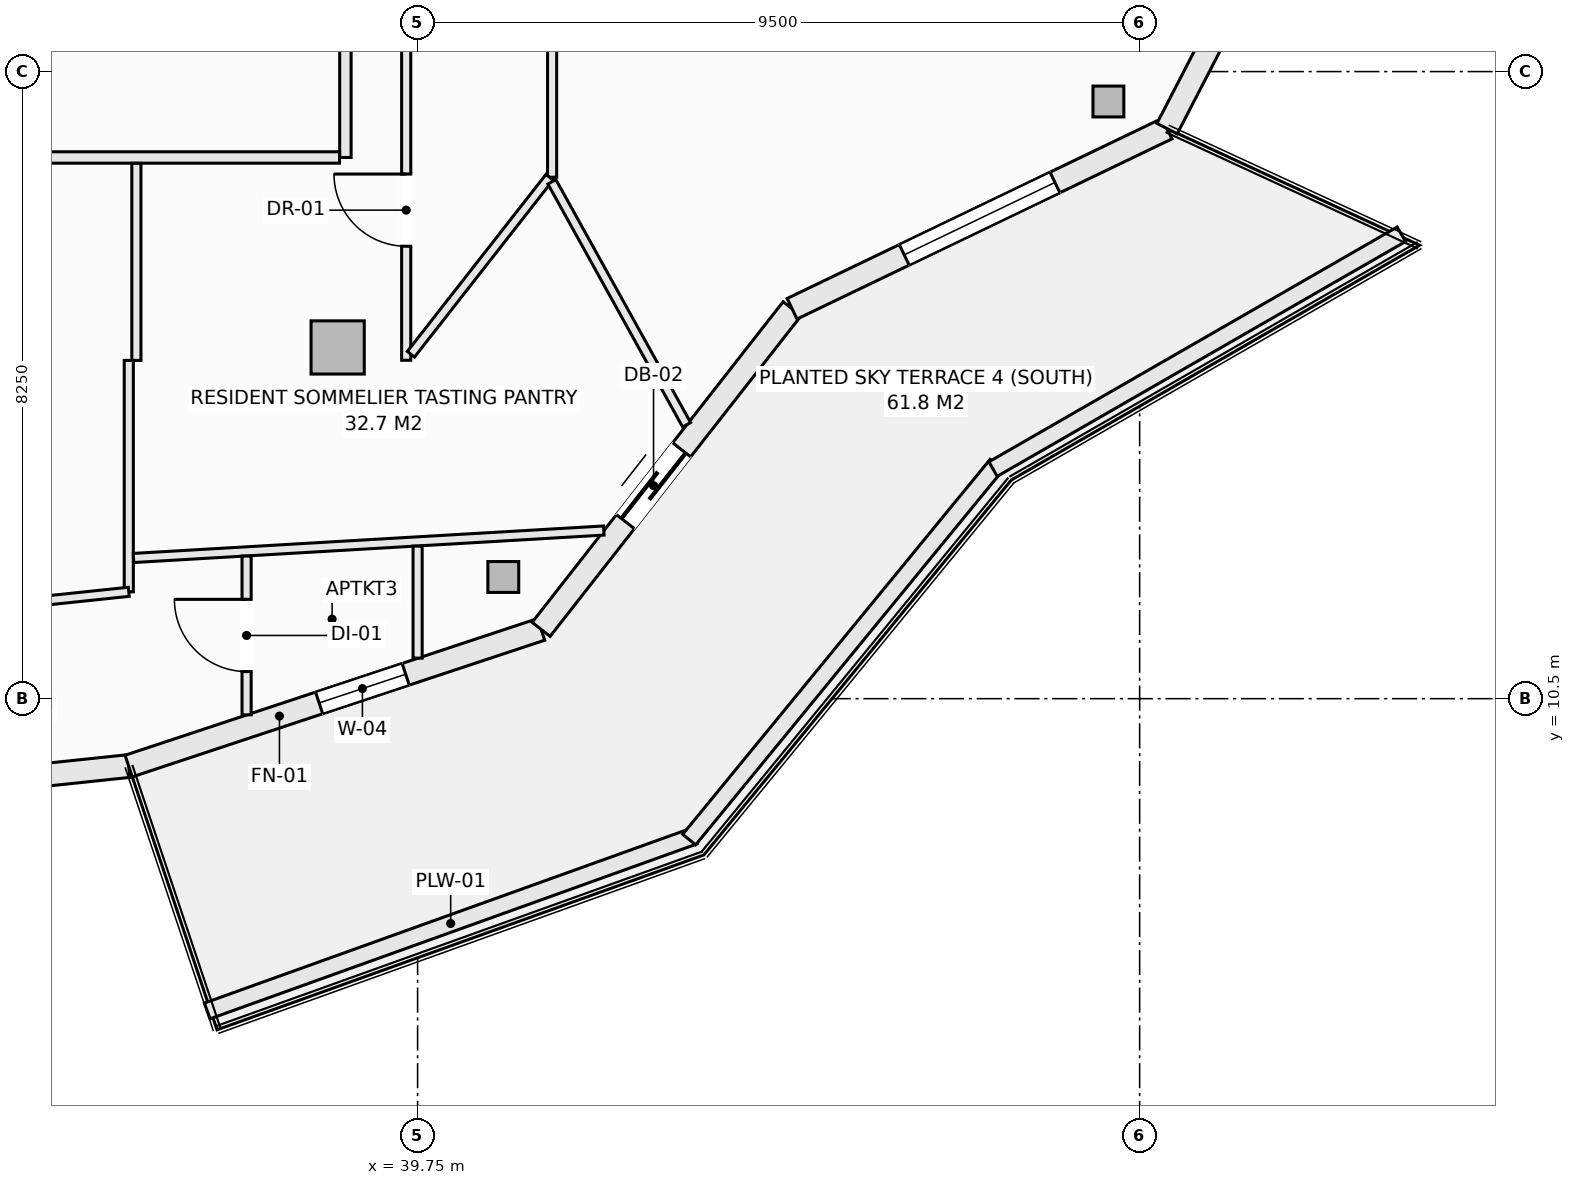
"""IFC4 building model, lengths in metres.
Left out: names, types, materials, properties, quantities, classifications, styles, units other than length and angle.
Written with IfcOpenShell. Run it as: python <this file> out.ifc"""

import sys

from ifc_helpers import new_model, si_unit, direction, frame, frame_2d, origin, origin_2d, place, context, subcontext, project, spatial, rectangle, hollow_rectangle, extrude, element, fill, save


model = new_model("IFC4")
c1 = context("Model", 3, precision=1e-05, world=origin(), true_north=direction((0.0, 1.0)))
c2 = subcontext(c1, "Body", "Model", "MODEL_VIEW")
j1 = project(units=[si_unit("LENGTHUNIT", "METRE"), si_unit("PLANEANGLEUNIT", "RADIAN")], contexts=[c1])
p1 = place(None, origin())
s1 = spatial("IfcSite", under=j1, at=p1, CompositionType="ELEMENT")
p2 = place(p1, origin())
s2 = spatial("IfcBuilding", under=s1, at=p2, CompositionType="ELEMENT")
p3 = place(p2, frame((0.0, 0.0, 242.6)))
s3 = spatial("IfcBuildingStorey", under=s2, at=p3, CompositionType="ELEMENT", Elevation=242.6)
for number, where, z_axis, x_axis in (
    (1, (40.878, 12.101, -0.27), (0.0, 0.0, 1.0), (1.0, 0.0, 0.0)),
    (2, (48.839, 18.356, -0.27), (0.0, 0.0, 1.0), (1.0, 0.0, 0.0)),
):
    element("IfcColumn", number, at=place(p3, frame(where, z_axis=z_axis, x_axis=x_axis)), inside=s3, PredefinedType="COLUMN", context=c2, shape_type="SweptSolid", body=[
        extrude(hollow_rectangle(XDim=0.406, YDim=0.406, WallThickness=0.016, at=origin_2d()), origin(), (0.0, 0.0, 1.0), 3.3),
    ])
p4 = place(p3, frame((38.698, 15.121, -0.27), z_axis=(0.0, 0.0, 1.0), x_axis=(1.0, 0.0, 0.0)))
e3 = element("IfcColumn", 3, at=p4, inside=s3, PredefinedType="COLUMN", context=c2, shape_type="SweptSolid", body=[
    extrude(rectangle(XDim=0.7, YDim=0.7, at=origin_2d()), origin(), (0.0, 0.0, 1.0), 3.3),
])
p5 = place(p3, frame((30.125, 9.0, 0.0), z_axis=(0.0, 0.0, 1.0), x_axis=(0.994500425783, 0.10473253132, 0.0)))
e4 = element("IfcWall", 4, at=p5, inside=s3, PredefinedType="SOLIDWALL", context=c2, shape_type="SweptSolid", body=[
    extrude(rectangle(XDim=5.856, YDim=0.3, at=frame_2d((2.928, 0.0))), origin(), (0.0, 0.0, 1.0), 2.605),
])
p6 = place(p5, frame((1.828, 0.0, 0.72)))
e5 = element("IfcOpeningElement", 5, at=p6, cuts=e4, PredefinedType="OPENING", context=c2, shape_type="SweptSolid", body=[
    extrude(rectangle(XDim=2.2, YDim=1.65, at=frame_2d((1.1, 0.825))), frame((0.0, 0.16, 0.0), z_axis=(0.0, -1.0, 0.0), x_axis=(1.0, 0.0, 0.0)), (0.0, 0.0, 1.0), 0.32),
])
p7 = place(p3, frame((35.948, 9.613, 0.0), z_axis=(0.0, 0.0, 1.0), x_axis=(0.949232769585, 0.314574552605, 0.0)))
e6 = element("IfcWall", 6, at=p7, inside=s3, PredefinedType="SOLIDWALL", context=c2, shape_type="SweptSolid", body=[
    extrude(rectangle(XDim=5.717, YDim=0.3, at=frame_2d((2.858, 0.0))), origin(), (0.0, 0.0, 1.0), 2.605),
])
p8 = place(p7, frame((2.64, 0.0, 0.72)))
e7 = element("IfcOpeningElement", 7, at=p8, cuts=e6, PredefinedType="OPENING", context=c2, shape_type="SweptSolid", body=[
    extrude(rectangle(XDim=1.2, YDim=1.65, at=frame_2d((0.6, 0.825))), frame((0.0, 0.16, 0.0), z_axis=(0.0, -1.0, 0.0), x_axis=(1.0, 0.0, 0.0)), (0.0, 0.0, 1.0), 0.32),
])
p9 = place(p3, frame((41.375, 11.412, 0.0), z_axis=(0.0, 0.0, 1.0), x_axis=(0.61644588519, 0.787397276241, 0.0)))
e8 = element("IfcWall", 8, at=p9, inside=s3, PredefinedType="SOLIDWALL", context=c2, shape_type="SweptSolid", body=[
    extrude(rectangle(XDim=5.357, YDim=0.3, at=frame_2d((2.678, 0.0))), origin(), (0.0, 0.0, 1.0), 2.605),
])
p10 = place(p9, frame((1.8, 0.0, 0.0)))
e9 = element("IfcOpeningElement", 9, at=p10, cuts=e8, PredefinedType="OPENING", context=c2, shape_type="SweptSolid", body=[
    extrude(rectangle(XDim=1.2, YDim=2.2, at=frame_2d((0.6, 1.1))), frame((0.0, 0.16, 0.0), z_axis=(0.0, -1.0, 0.0), x_axis=(1.0, 0.0, 0.0)), (0.0, 0.0, 1.0), 0.32),
])
p11 = place(p3, frame((44.677, 15.63, 0.0), z_axis=(0.0, 0.0, 1.0), x_axis=(0.901355238351, 0.433080517106, 0.0)))
e10 = element("IfcWall", 10, at=p11, inside=s3, PredefinedType="SOLIDWALL", context=c2, shape_type="SweptSolid", body=[
    extrude(rectangle(XDim=5.473, YDim=0.3, at=frame_2d((2.737, 0.0))), origin(), (0.0, 0.0, 1.0), 2.605),
])
p12 = place(p11, frame((1.637, 0.0, 0.72)))
e11 = element("IfcOpeningElement", 11, at=p12, cuts=e10, PredefinedType="OPENING", context=c2, shape_type="SweptSolid", body=[
    extrude(rectangle(XDim=2.2, YDim=1.65, at=frame_2d((1.1, 0.825))), frame((0.0, 0.16, 0.0), z_axis=(0.0, -1.0, 0.0), x_axis=(1.0, 0.0, 0.0)), (0.0, 0.0, 1.0), 0.32),
])
p13 = place(p3, frame((49.611, 18.0, 0.0), z_axis=(0.0, 0.0, 1.0), x_axis=(0.459793771602, 0.888025724625, 0.0)))
e12 = element("IfcWall", 12, at=p13, inside=s3, PredefinedType="SOLIDWALL", context=c2, shape_type="SweptSolid", body=[
    extrude(rectangle(XDim=4.889, YDim=0.3, at=frame_2d((2.444, 0.0))), origin(), (0.0, 0.0, 1.0), 2.605),
])
p14 = place(p13, frame((1.344, 0.0, 0.72)))
e13 = element("IfcOpeningElement", 13, at=p14, cuts=e12, PredefinedType="OPENING", context=c2, shape_type="SweptSolid", body=[
    extrude(rectangle(XDim=2.2, YDim=1.65, at=frame_2d((1.1, 0.825))), frame((0.0, 0.16, 0.0), z_axis=(0.0, -1.0, 0.0), x_axis=(1.0, 0.0, 0.0)), (0.0, 0.0, 1.0), 0.32),
])
p15 = place(p3, frame((36.982, 6.392, 0.0), z_axis=(0.0, 0.0, 1.0), x_axis=(0.941139090914, 0.338019543152, 0.0)))
e14 = element("IfcWall", 14, at=p15, inside=s3, PredefinedType="PARAPET", context=c2, shape_type="SweptSolid", body=[
    extrude(rectangle(XDim=6.807, YDim=0.22, at=frame_2d((3.403, 0.0))), origin(), (0.0, 0.0, 1.0), 0.52),
])
p16 = place(p3, frame((43.323, 8.646, 0.0), z_axis=(0.0, 0.0, 1.0), x_axis=(0.63407318032, 0.77327304492, 0.0)))
e15 = element("IfcWall", 15, at=p16, inside=s3, PredefinedType="PARAPET", context=c2, shape_type="SweptSolid", body=[
    extrude(rectangle(XDim=6.379, YDim=0.22, at=frame_2d((3.189, 0.0))), origin(), (0.0, 0.0, 1.0), 0.52),
])
p17 = place(p3, frame((47.321, 13.521, 0.0), z_axis=(0.0, 0.0, 1.0), x_axis=(0.866901621005, 0.49847926687, 0.0)))
e16 = element("IfcWall", 16, at=p17, inside=s3, PredefinedType="PARAPET", context=c2, shape_type="SweptSolid", body=[
    extrude(rectangle(XDim=6.197, YDim=0.22, at=frame_2d((3.098, 0.0))), origin(), (0.0, 0.0, 1.0), 0.52),
])
p18 = place(p3, frame((38.8, 17.62, 0.0), z_axis=(0.0, 0.0, 1.0), x_axis=(0.0, 1.0, 0.0)))
e17 = element("IfcWall", 17, at=p18, inside=s3, PredefinedType="PARTITIONING", context=c2, shape_type="SweptSolid", body=[
    extrude(rectangle(XDim=2.18, YDim=0.15, at=frame_2d((1.09, 0.0))), origin(), (0.0, 0.0, 1.0), 3.03),
])
p19 = place(p3, frame((30.077, 17.62, 0.0), z_axis=(0.0, 0.0, 1.0), x_axis=(1.0, 0.0, 0.0)))
e18 = element("IfcWall", 18, at=p19, inside=s3, PredefinedType="PARTITIONING", context=c2, shape_type="SweptSolid", body=[
    extrude(rectangle(XDim=8.646, YDim=0.15, at=frame_2d((4.323, 0.0))), origin(), (0.0, 0.0, 1.0), 3.03),
])
p20 = place(p19, frame((2.717, 0.0, 0.0)))
e19 = element("IfcOpeningElement", 19, at=p20, cuts=e18, PredefinedType="OPENING", context=c2, shape_type="SweptSolid", body=[
    extrude(rectangle(XDim=0.95, YDim=2.1, at=frame_2d((0.475, 1.05))), frame((0.0, 0.085, 0.0), z_axis=(0.0, -1.0, 0.0), x_axis=(1.0, 0.0, 0.0)), (0.0, 0.0, 1.0), 0.17),
])
p21 = place(p3, frame((39.6, 14.952, 0.0), z_axis=(0.0, 0.0, 1.0), x_axis=(0.0, 1.0, 0.0)))
e20 = element("IfcWall", 20, at=p21, inside=s3, PredefinedType="PARTITIONING", context=c2, shape_type="SweptSolid", body=[
    extrude(rectangle(XDim=8.068, YDim=0.12, at=frame_2d((4.034, 0.0))), origin(), (0.0, 0.0, 1.0), 2.478),
])
p22 = place(p21, frame((1.5, 0.0, 0.0)))
e21 = element("IfcOpeningElement", 21, at=p22, cuts=e20, PredefinedType="OPENING", context=c2, shape_type="SweptSolid", body=[
    extrude(rectangle(XDim=0.95, YDim=2.1, at=frame_2d((0.475, 1.05))), frame((0.0, 0.07, 0.0), z_axis=(0.0, -1.0, 0.0), x_axis=(1.0, 0.0, 0.0)), (0.0, 0.0, 1.0), 0.14),
])
p23 = place(p3, frame((41.52, 17.36, 0.0), z_axis=(0.0, 0.0, 1.0), x_axis=(0.0, 1.0, 0.0)))
e22 = element("IfcWall", 22, at=p23, inside=s3, PredefinedType="PARTITIONING", context=c2, shape_type="SweptSolid", body=[
    extrude(rectangle(XDim=3.447, YDim=0.12, at=frame_2d((1.723, 0.0))), origin(), (0.0, 0.0, 1.0), 3.03),
])
p24 = place(p3, frame((39.662, 15.031, 0.0), z_axis=(0.0, 0.0, 1.0), x_axis=(0.616497420092, 0.787356927334, 0.0)))
e23 = element("IfcWall", 23, at=p24, inside=s3, PredefinedType="PARTITIONING", context=c2, shape_type="SweptSolid", body=[
    extrude(rectangle(XDim=2.958, YDim=0.12, at=frame_2d((1.479, 0.0))), origin(), (0.0, 0.0, 1.0), 3.03),
])
p25 = place(p3, frame((36.05, 14.95, 0.0), z_axis=(0.0, 0.0, 1.0), x_axis=(0.0, 1.0, 0.0)))
e24 = element("IfcWall", 24, at=p25, inside=s3, PredefinedType="PARTITIONING", context=c2, shape_type="SweptSolid", body=[
    extrude(rectangle(XDim=2.593, YDim=0.12, at=frame_2d((1.296, 0.0))), origin(), (0.0, 0.0, 1.0), 3.03),
])
p26 = place(p3, frame((35.95, 11.906, 0.0), z_axis=(0.0, 0.0, 1.0), x_axis=(0.0, 1.0, 0.0)))
e25 = element("IfcWall", 25, at=p26, inside=s3, PredefinedType="PARTITIONING", context=c2, shape_type="SweptSolid", body=[
    extrude(rectangle(XDim=3.044, YDim=0.12, at=frame_2d((1.522, 0.0))), origin(), (0.0, 0.0, 1.0), 3.03),
])
p27 = place(p3, frame((34.468, 11.75, 0.0), z_axis=(0.0, 0.0, 1.0), x_axis=(0.994504555135, 0.104693313135, 0.0)))
e26 = element("IfcWall", 26, at=p27, inside=s3, PredefinedType="PARTITIONING", context=c2, shape_type="SweptSolid", body=[
    extrude(rectangle(XDim=1.49, YDim=0.12, at=frame_2d((0.745, 0.0))), origin(), (0.0, 0.0, 1.0), 3.03),
])
p28 = place(p3, frame((36.012, 12.351, 0.0), z_axis=(0.0, 0.0, 1.0), x_axis=(0.998301967663, 0.058251020246, 0.0)))
e27 = element("IfcWall", 27, at=p28, inside=s3, PredefinedType="PARTITIONING", context=c2, shape_type="SweptSolid", body=[
    extrude(rectangle(XDim=6.199, YDim=0.12, at=frame_2d((3.099, 0.0))), origin(), (0.0, 0.0, 1.0), 2.605),
])
p29 = place(p3, frame((37.5, 10.288, 0.0), z_axis=(0.0, 0.0, 1.0), x_axis=(0.0, 1.0, 0.0)))
e28 = element("IfcWall", 28, at=p29, inside=s3, PredefinedType="PARTITIONING", context=c2, shape_type="SweptSolid", body=[
    extrude(rectangle(XDim=2.088, YDim=0.12, at=frame_2d((1.044, 0.0))), origin(), (0.0, 0.0, 1.0), 3.03),
])
p30 = place(p29, frame((0.569, 0.0, 0.0)))
e29 = element("IfcOpeningElement", 29, at=p30, cuts=e28, PredefinedType="OPENING", context=c2, shape_type="SweptSolid", body=[
    extrude(rectangle(XDim=0.95, YDim=2.1, at=frame_2d((0.475, 1.05))), frame((0.0, 0.07, 0.0), z_axis=(0.0, -1.0, 0.0), x_axis=(1.0, 0.0, 0.0)), (0.0, 0.0, 1.0), 0.14),
])
p31 = place(p3, frame((39.75, 11.033, 0.0), z_axis=(0.0, 0.0, 1.0), x_axis=(0.0, 1.0, 0.0)))
e30 = element("IfcWall", 30, at=p31, inside=s3, PredefinedType="PARTITIONING", context=c2, shape_type="SweptSolid", body=[
    extrude(rectangle(XDim=1.474, YDim=0.12, at=frame_2d((0.737, 0.0))), origin(), (0.0, 0.0, 1.0), 3.03),
])
p32 = place(p3, frame((41.517, 17.3, 0.0), z_axis=(0.0, 0.0, 1.0), x_axis=(0.484911097078, -0.874563449917, 0.0)))
e31 = element("IfcWall", 31, at=p32, inside=s3, PredefinedType="PARTITIONING", context=c2, shape_type="SweptSolid", body=[
    extrude(rectangle(XDim=3.655, YDim=0.12, at=frame_2d((1.827, 0.0))), origin(), (0.0, 0.0, 1.0), 2.77),
])
p33 = place(p8, origin())
e32 = element("IfcWindow", 32, at=p33, inside=s3, PartitioningType="SINGLE_PANEL", PredefinedType="WINDOW", context=c2, shape_type="SweptSolid", body=[
    extrude(rectangle(XDim=1.2, YDim=1.65, at=frame_2d((0.6, 0.825))), frame((0.0, 0.03, 0.0), z_axis=(0.0, -1.0, 0.0), x_axis=(1.0, 0.0, 0.0)), (0.0, 0.0, 1.0), 0.06),
])
fill(e7, e32)
p34 = place(p10, frame((1.2, 0.0, 0.0), z_axis=(0.0, 0.0, 1.0), x_axis=(-1.0, 0.0, 0.0)))
e33 = element("IfcDoor", 33, at=p34, inside=s3, OperationType="SLIDING_TO_LEFT", PredefinedType="DOOR", context=c2, shape_type="SweptSolid", body=[
    extrude(rectangle(XDim=1.2, YDim=2.2, at=frame_2d((0.6, 1.1))), frame((0.0, 0.025, 0.0), z_axis=(0.0, -1.0, 0.0), x_axis=(1.0, 0.0, 0.0)), (0.0, 0.0, 1.0), 0.05),
])
fill(e9, e33)
p35 = place(p12, origin())
e34 = element("IfcWindow", 34, at=p35, inside=s3, PartitioningType="SINGLE_PANEL", PredefinedType="WINDOW", context=c2, shape_type="SweptSolid", body=[
    extrude(rectangle(XDim=2.2, YDim=1.65, at=frame_2d((1.1, 0.825))), frame((0.0, 0.03, 0.0), z_axis=(0.0, -1.0, 0.0), x_axis=(1.0, 0.0, 0.0)), (0.0, 0.0, 1.0), 0.06),
])
fill(e11, e34)
p36 = place(p22, origin())
e35 = element("IfcDoor", 35, at=p36, inside=s3, OperationType="SINGLE_SWING_RIGHT", PredefinedType="DOOR", context=c2, shape_type="SweptSolid", body=[
    extrude(rectangle(XDim=0.95, YDim=2.1, at=frame_2d((0.475, 1.05))), frame((0.0, 0.025, 0.0), z_axis=(0.0, -1.0, 0.0), x_axis=(1.0, 0.0, 0.0)), (0.0, 0.0, 1.0), 0.05),
])
fill(e21, e35)
p37 = place(p30, origin())
e36 = element("IfcDoor", 36, at=p37, inside=s3, OperationType="SINGLE_SWING_RIGHT", PredefinedType="DOOR", context=c2, shape_type="SweptSolid", body=[
    extrude(rectangle(XDim=0.95, YDim=2.1, at=frame_2d((0.475, 1.05))), frame((0.0, 0.025, 0.0), z_axis=(0.0, -1.0, 0.0), x_axis=(1.0, 0.0, 0.0)), (0.0, 0.0, 1.0), 0.05),
])
fill(e29, e36)
save(model, sys.argv[1])
